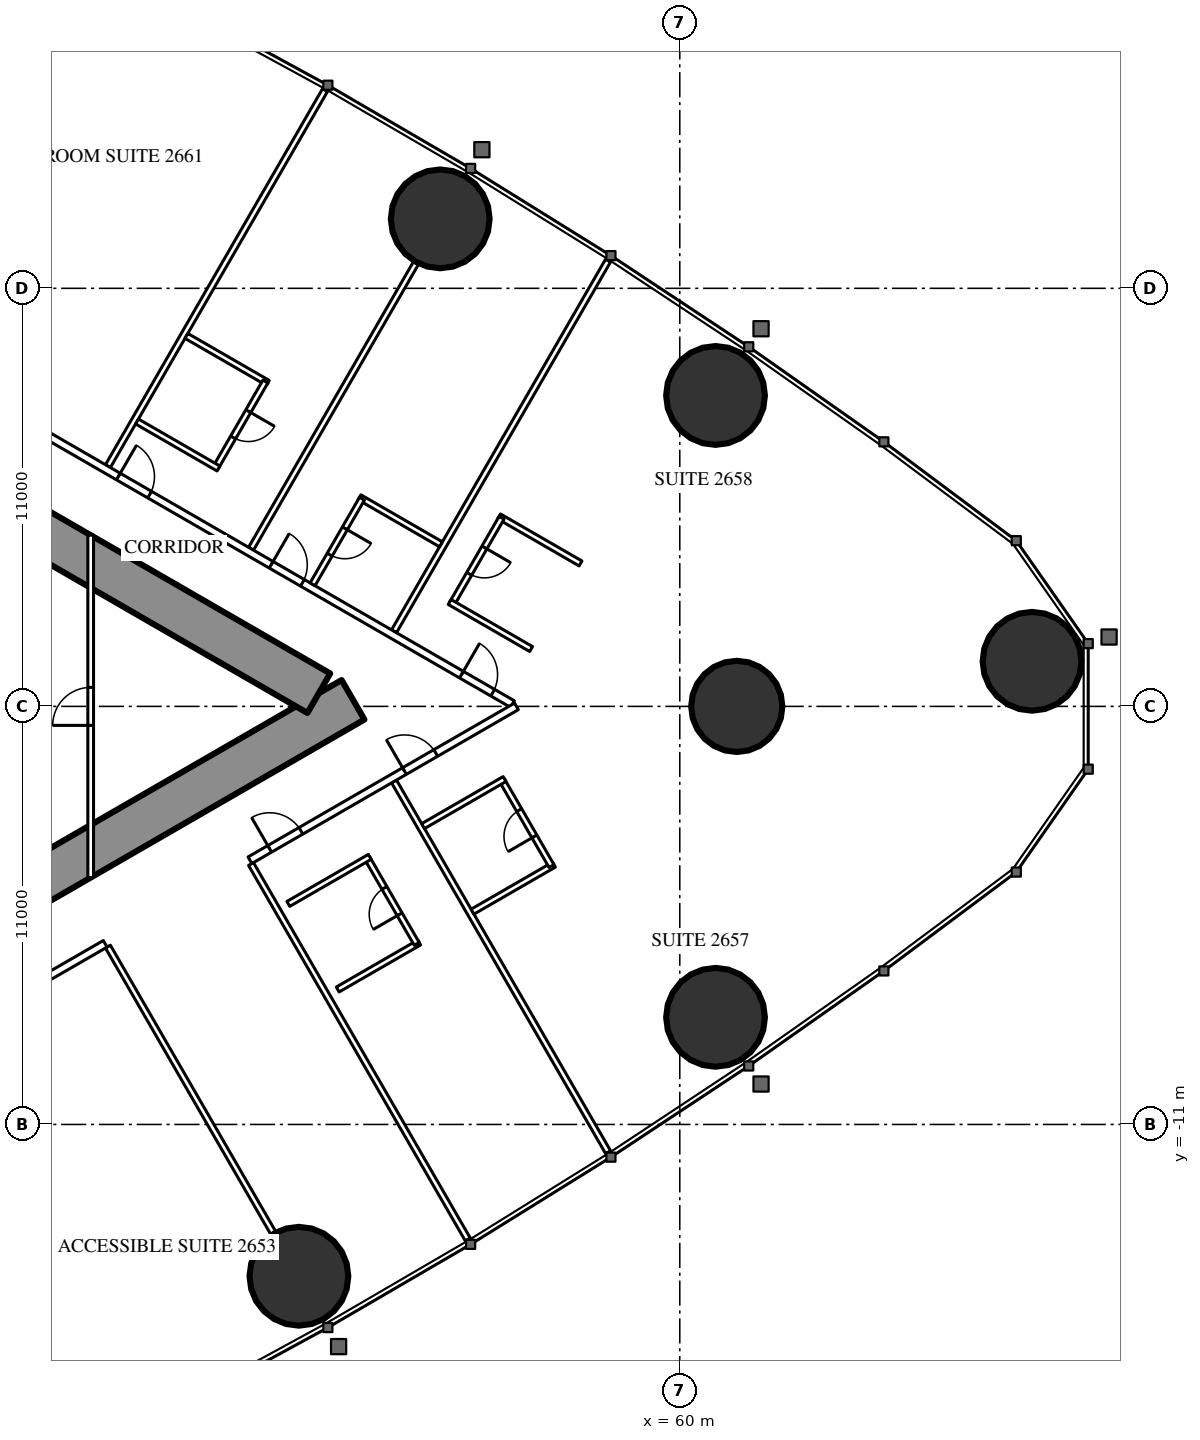
"""IFC4 building model, lengths in metres.
Left out: names, types, materials, properties, quantities, classifications, styles, units other than length and angle.
Written with IfcOpenShell. Run it as: python <this file> out.ifc"""

import sys

from ifc_helpers import new_model, si_unit, direction, frame, frame_2d, origin, origin_2d, place, context, subcontext, project, spatial, rectangle, circle, hollow_circle, extrude, element, fill, save


model = new_model("IFC4")
c1 = context("Model", 3, precision=1e-05, world=origin(), true_north=direction((0.0, 1.0)))
c2 = subcontext(c1, "Body", "Model", "MODEL_VIEW")
j1 = project(units=[si_unit("LENGTHUNIT", "METRE"), si_unit("PLANEANGLEUNIT", "RADIAN")], contexts=[c1])
p1 = place(None, origin())
s1 = spatial("IfcSite", under=j1, at=p1, CompositionType="ELEMENT")
p2 = place(p1, origin())
s2 = spatial("IfcBuilding", under=s1, at=p2, CompositionType="ELEMENT")
p3 = place(p2, frame((0.0, 0.0, 101.1)))
s3 = spatial("IfcBuildingStorey", under=s2, at=p3, CompositionType="ELEMENT", Elevation=101.1)
for number, where, z_axis, x_axis in (
    (1, (69.269, 1.187, 0.0), (0.0, 0.0, 1.0), (1.0, 0.0, 0.0)),
    (2, (60.941, 8.181, 0.0), (0.0, 0.0, 1.0), (1.0, 0.0, 0.0)),
    (3, (53.697, 12.827, 0.0), (0.0, 0.0, 1.0), (1.0, 0.0, 0.0)),
    (4, (49.979, -14.994, 0.0), (0.0, 0.0, 1.0), (1.0, 0.0, 0.0)),
    (5, (60.941, -8.181, 0.0), (0.0, 0.0, 1.0), (1.0, 0.0, 0.0)),
):
    element("IfcColumn", number, at=place(p3, frame(where, z_axis=z_axis, x_axis=x_axis)), inside=s3, PredefinedType="COLUMN", context=c2, shape_type="SweptSolid", body=[
        extrude(hollow_circle(Radius=1.3, WallThickness=0.1, at=origin_2d()), origin(), (0.0, 0.0, 1.0), 3.5),
    ])
p4 = place(p3, frame((61.5, 0.0, 0.0), z_axis=(0.0, 0.0, 1.0), x_axis=(1.0, 0.0, 0.0)))
e6 = element("IfcColumn", 6, at=p4, inside=s3, PredefinedType="COLUMN", context=c2, shape_type="SweptSolid", body=[
    extrude(circle(Radius=1.2, at=origin_2d()), origin(), (0.0, 0.0, 1.0), 3.5),
])
p5 = place(p3, frame((27.2, -13.8, 0.0), z_axis=(0.0, 0.0, 1.0), x_axis=(0.866027159892, 0.499996958321, 0.0)))
e7 = element("IfcWall", 7, at=p5, inside=s3, PredefinedType="SHEAR", context=c2, shape_type="SweptSolid", body=[
    extrude(rectangle(XDim=27.947, YDim=1.2, at=frame_2d((13.973, 0.0))), origin(), (0.0, 0.0, 1.0), 3.5),
])
p6 = place(p5, frame((4.6, 0.0, 0.0)))
e8 = element("IfcOpeningElement", 8, at=p6, cuts=e7, PredefinedType="OPENING", context=c2, shape_type="SweptSolid", body=[
    extrude(rectangle(XDim=1.0, YDim=2.2, at=frame_2d((0.5, 1.1))), frame((0.0, 0.61, 0.0), z_axis=(0.0, -1.0, 0.0), x_axis=(1.0, 0.0, 0.0)), (0.0, 0.0, 1.0), 1.22),
])
p7 = place(p5, frame((13.395, 0.0, 0.0)))
e9 = element("IfcOpeningElement", 9, at=p7, cuts=e7, PredefinedType="OPENING", context=c2, shape_type="SweptSolid", body=[
    extrude(rectangle(XDim=1.8, YDim=2.2, at=frame_2d((0.9, 1.1))), frame((0.0, 0.61, 0.0), z_axis=(0.0, -1.0, 0.0), x_axis=(1.0, 0.0, 0.0)), (0.0, 0.0, 1.0), 1.22),
])
p8 = place(p3, frame((27.2, 13.8, 0.0), z_axis=(0.0, 0.0, 1.0), x_axis=(0.866024515034, -0.500001539357, 0.0)))
e10 = element("IfcWall", 10, at=p8, inside=s3, PredefinedType="SHEAR", context=c2, shape_type="SweptSolid", body=[
    extrude(rectangle(XDim=26.907, YDim=1.2, at=frame_2d((13.454, 0.0))), origin(), (0.0, 0.0, 1.0), 3.5),
])
p9 = place(p8, frame((4.6, 0.0, 0.0)))
e11 = element("IfcOpeningElement", 11, at=p9, cuts=e10, PredefinedType="OPENING", context=c2, shape_type="SweptSolid", body=[
    extrude(rectangle(XDim=1.0, YDim=2.2, at=frame_2d((0.5, 1.1))), frame((0.0, 0.61, 0.0), z_axis=(0.0, -1.0, 0.0), x_axis=(1.0, 0.0, 0.0)), (0.0, 0.0, 1.0), 1.22),
])
p10 = place(p8, frame((13.395, 0.0, 0.0)))
e12 = element("IfcOpeningElement", 12, at=p10, cuts=e10, PredefinedType="OPENING", context=c2, shape_type="SweptSolid", body=[
    extrude(rectangle(XDim=1.8, YDim=2.2, at=frame_2d((0.9, 1.1))), frame((0.0, 0.61, 0.0), z_axis=(0.0, -1.0, 0.0), x_axis=(1.0, 0.0, 0.0)), (0.0, 0.0, 1.0), 1.22),
])
p11 = place(p3, frame((44.954, -6.321, 0.0), z_axis=(0.0, 0.0, 1.0), x_axis=(0.500018676722, -0.866014620505, 0.0)))
e13 = element("IfcWall", 13, at=p11, inside=s3, PredefinedType="PARTITIONING", context=c2, shape_type="SweptSolid", body=[
    extrude(rectangle(XDim=8.704, YDim=0.15, at=frame_2d((4.352, 0.0))), origin(), (0.0, 0.0, 1.0), 2.2),
])
p12 = place(p3, frame((48.719, -4.147, 0.0), z_axis=(0.0, 0.0, 1.0), x_axis=(0.499990498062, -0.866030889661, 0.0)))
e14 = element("IfcWall", 14, at=p12, inside=s3, PredefinedType="PARTITIONING", context=c2, shape_type="SweptSolid", body=[
    extrude(rectangle(XDim=11.406, YDim=0.15, at=frame_2d((5.703, 0.0))), origin(), (0.0, 0.0, 1.0), 3.25),
])
p13 = place(p3, frame((52.481, -1.975, 0.0), z_axis=(0.0, 0.0, 1.0), x_axis=(0.500003867771, -0.866023170714, 0.0)))
e15 = element("IfcWall", 15, at=p13, inside=s3, PredefinedType="PARTITIONING", context=c2, shape_type="SweptSolid", body=[
    extrude(rectangle(XDim=11.265, YDim=0.15, at=frame_2d((5.632, 0.0))), origin(), (0.0, 0.0, 1.0), 3.25),
])
p14 = place(p3, frame((44.954, 6.321, 0.0), z_axis=(0.0, 0.0, 1.0), x_axis=(0.500009815811, 0.866019736549, 0.0)))
e16 = element("IfcWall", 16, at=p14, inside=s3, PredefinedType="PARTITIONING", context=c2, shape_type="SweptSolid", body=[
    extrude(rectangle(XDim=11.424, YDim=0.15, at=frame_2d((5.712, 0.0))), origin(), (0.0, 0.0, 1.0), 3.25),
])
p15 = place(p3, frame((48.719, 4.147, 0.0), z_axis=(0.0, 0.0, 1.0), x_axis=(0.499993328235, 0.866029255696, 0.0)))
e17 = element("IfcWall", 17, at=p15, inside=s3, PredefinedType="PARTITIONING", context=c2, shape_type="SweptSolid", body=[
    extrude(rectangle(XDim=8.686, YDim=0.15, at=frame_2d((4.343, 0.0))), origin(), (0.0, 0.0, 1.0), 2.2),
])
p16 = place(p3, frame((52.481, 1.975, 0.0), z_axis=(0.0, 0.0, 1.0), x_axis=(0.500003867771, 0.866023170714, 0.0)))
e18 = element("IfcWall", 18, at=p16, inside=s3, PredefinedType="PARTITIONING", context=c2, shape_type="SweptSolid", body=[
    extrude(rectangle(XDim=11.265, YDim=0.15, at=frame_2d((5.632, 0.0))), origin(), (0.0, 0.0, 1.0), 3.25),
])
p17 = place(p3, frame((36.834, 10.894, 0.0), z_axis=(0.0, 0.0, 1.0), x_axis=(0.866028157229, -0.499995230863, 0.0)))
e19 = element("IfcWall", 19, at=p17, inside=s3, PredefinedType="PARTITIONING", context=c2, shape_type="SweptSolid", body=[
    extrude(rectangle(XDim=21.667, YDim=0.2, at=frame_2d((10.833, 0.0))), origin(), (0.0, 0.0, 1.0), 3.25),
])
p18 = place(p17, frame((20.117, 0.0, 0.0)))
e20 = element("IfcOpeningElement", 20, at=p18, cuts=e19, PredefinedType="OPENING", context=c2, shape_type="SweptSolid", body=[
    extrude(rectangle(XDim=0.95, YDim=2.2, at=frame_2d((0.475, 1.1))), frame((0.0, 0.11, 0.0), z_axis=(0.0, -1.0, 0.0), x_axis=(1.0, 0.0, 0.0)), (0.0, 0.0, 1.0), 0.22),
])
p19 = place(p17, frame((14.335, 0.0, 0.0)))
e21 = element("IfcOpeningElement", 21, at=p19, cuts=e19, PredefinedType="OPENING", context=c2, shape_type="SweptSolid", body=[
    extrude(rectangle(XDim=0.95, YDim=2.2, at=frame_2d((0.475, 1.1))), frame((0.0, 0.11, 0.0), z_axis=(0.0, -1.0, 0.0), x_axis=(1.0, 0.0, 0.0)), (0.0, 0.0, 1.0), 0.22),
])
p20 = place(p17, frame((9.693, 0.0, 0.0)))
e22 = element("IfcOpeningElement", 22, at=p20, cuts=e19, PredefinedType="OPENING", context=c2, shape_type="SweptSolid", body=[
    extrude(rectangle(XDim=0.95, YDim=2.2, at=frame_2d((0.475, 1.1))), frame((0.0, 0.11, 0.0), z_axis=(0.0, -1.0, 0.0), x_axis=(1.0, 0.0, 0.0)), (0.0, 0.0, 1.0), 0.22),
])
p21 = place(p17, frame((2.95, 0.0, 0.0)))
e23 = element("IfcOpeningElement", 23, at=p21, cuts=e19, PredefinedType="OPENING", context=c2, shape_type="SweptSolid", body=[
    extrude(rectangle(XDim=0.95, YDim=2.2, at=frame_2d((0.475, 1.1))), frame((0.0, 0.11, 0.0), z_axis=(0.0, -1.0, 0.0), x_axis=(1.0, 0.0, 0.0)), (0.0, 0.0, 1.0), 0.22),
])
p22 = place(p3, frame((37.96, -10.243, 0.0), z_axis=(0.0, 0.0, 1.0), x_axis=(0.86603350054, 0.499985975746, 0.0)))
e24 = element("IfcWall", 24, at=p22, inside=s3, PredefinedType="PARTITIONING", context=c2, shape_type="SweptSolid", body=[
    extrude(rectangle(XDim=7.993, YDim=0.2, at=frame_2d((3.997, 0.0))), origin(), (0.0, 0.0, 1.0), 3.25),
])
p23 = place(p22, frame((3.35, 0.0, 0.0)))
e25 = element("IfcOpeningElement", 25, at=p23, cuts=e24, PredefinedType="OPENING", context=c2, shape_type="SweptSolid", body=[
    extrude(rectangle(XDim=1.0, YDim=2.2, at=frame_2d((0.5, 1.1))), frame((0.0, 0.11, 0.0), z_axis=(0.0, -1.0, 0.0), x_axis=(1.0, 0.0, 0.0)), (0.0, 0.0, 1.0), 0.22),
])
p24 = place(p3, frame((48.69, -4.048, 0.0), z_axis=(0.0, 0.0, 1.0), x_axis=(0.866026410209, 0.499998256818, 0.0)))
e26 = element("IfcWall", 26, at=p24, inside=s3, PredefinedType="PARTITIONING", context=c2, shape_type="SweptSolid", body=[
    extrude(rectangle(XDim=8.097, YDim=0.2, at=frame_2d((4.048, 0.0))), origin(), (0.0, 0.0, 1.0), 3.25),
])
p25 = place(p24, frame((0.6, 0.0, 0.0)))
e27 = element("IfcOpeningElement", 27, at=p25, cuts=e26, PredefinedType="OPENING", context=c2, shape_type="SweptSolid", body=[
    extrude(rectangle(XDim=0.95, YDim=2.2, at=frame_2d((0.475, 1.1))), frame((0.0, 0.11, 0.0), z_axis=(0.0, -1.0, 0.0), x_axis=(1.0, 0.0, 0.0)), (0.0, 0.0, 1.0), 0.22),
])
p26 = place(p24, frame((4.695, 0.0, 0.0)))
e28 = element("IfcOpeningElement", 28, at=p26, cuts=e26, PredefinedType="OPENING", context=c2, shape_type="SweptSolid", body=[
    extrude(rectangle(XDim=0.95, YDim=2.2, at=frame_2d((0.475, 1.1))), frame((0.0, 0.11, 0.0), z_axis=(0.0, -1.0, 0.0), x_axis=(1.0, 0.0, 0.0)), (0.0, 0.0, 1.0), 0.22),
])
p27 = place(p3, frame((51.0, -7.449, 0.0), z_axis=(0.0, 0.0, 1.0), x_axis=(0.866006523861, 0.500032699561, 0.0)))
e29 = element("IfcWall", 29, at=p27, inside=s3, PredefinedType="PARTITIONING", context=c2, shape_type="SweptSolid", body=[
    extrude(rectangle(XDim=2.475, YDim=0.15, at=frame_2d((1.237, 0.0))), origin(), (0.0, 0.0, 1.0), 3.25),
])
p28 = place(p3, frame((51.778, -3.998, 0.0), z_axis=(0.0, 0.0, 1.0), x_axis=(0.500047596559, -0.865997922154, 0.0)))
e30 = element("IfcWall", 30, at=p28, inside=s3, PredefinedType="PARTITIONING", context=c2, shape_type="SweptSolid", body=[
    extrude(rectangle(XDim=2.6, YDim=0.15, at=frame_2d((1.3, 0.0))), origin(), (0.0, 0.0, 1.0), 3.25),
])
p29 = place(p28, frame((0.9, 0.0, 0.0)))
e31 = element("IfcOpeningElement", 31, at=p29, cuts=e30, PredefinedType="OPENING", context=c2, shape_type="SweptSolid", body=[
    extrude(rectangle(XDim=0.8, YDim=2.2, at=frame_2d((0.4, 1.1))), frame((0.0, 0.085, 0.0), z_axis=(0.0, -1.0, 0.0), x_axis=(1.0, 0.0, 0.0)), (0.0, 0.0, 1.0), 0.17),
])
for number, where, z_axis, x_axis in (
    (32, (49.7, -5.198, 0.0), (0.0, 0.0, 1.0), (0.866, 0.5, 0.0)),
    (33, (54.546, -5.402, 0.0), (0.0, 0.0, 1.0), (0.866, 0.5, 0.0)),
):
    element("IfcWall", number, at=place(p3, frame(where, z_axis=z_axis, x_axis=x_axis)), inside=s3, PredefinedType="PARTITIONING", context=c2, shape_type="SweptSolid", body=[
        extrude(rectangle(XDim=2.475, YDim=0.15, at=frame_2d((1.237, 0.0))), origin(), (0.0, 0.0, 1.0), 3.25),
    ])
p30 = place(p3, frame((55.325, -1.95, 0.0), z_axis=(0.0, 0.0, 1.0), x_axis=(0.500006934395, -0.866021400173, 0.0)))
e34 = element("IfcWall", 34, at=p30, inside=s3, PredefinedType="PARTITIONING", context=c2, shape_type="SweptSolid", body=[
    extrude(rectangle(XDim=2.6, YDim=0.15, at=frame_2d((1.3, 0.0))), origin(), (0.0, 0.0, 1.0), 3.25),
])
p31 = place(p30, frame((0.9, 0.0, 0.0)))
e35 = element("IfcOpeningElement", 35, at=p31, cuts=e34, PredefinedType="OPENING", context=c2, shape_type="SweptSolid", body=[
    extrude(rectangle(XDim=0.8, YDim=2.2, at=frame_2d((0.4, 1.1))), frame((0.0, 0.085, 0.0), z_axis=(0.0, -1.0, 0.0), x_axis=(1.0, 0.0, 0.0)), (0.0, 0.0, 1.0), 0.17),
])
for number, where, z_axis, x_axis in (
    (36, (53.246, -3.15, 0.0), (0.0, 0.0, 1.0), (0.866, 0.5, 0.0)),
    (37, (55.245, 4.998, 0.0), (0.0, 0.0, 1.0), (0.866, -0.5, 0.0)),
):
    element("IfcWall", number, at=place(p3, frame(where, z_axis=z_axis, x_axis=x_axis)), inside=s3, PredefinedType="PARTITIONING", context=c2, shape_type="SweptSolid", body=[
        extrude(rectangle(XDim=2.475, YDim=0.15, at=frame_2d((1.237, 0.0))), origin(), (0.0, 0.0, 1.0), 3.25),
    ])
p32 = place(p3, frame((54.01, 2.709, 0.0), z_axis=(0.0, 0.0, 1.0), x_axis=(0.500006934395, 0.866021400173, 0.0)))
e38 = element("IfcWall", 38, at=p32, inside=s3, PredefinedType="PARTITIONING", context=c2, shape_type="SweptSolid", body=[
    extrude(rectangle(XDim=2.6, YDim=0.15, at=frame_2d((1.3, 0.0))), origin(), (0.0, 0.0, 1.0), 3.25),
])
p33 = place(p32, frame((0.9, 0.0, 0.0)))
e39 = element("IfcOpeningElement", 39, at=p33, cuts=e38, PredefinedType="OPENING", context=c2, shape_type="SweptSolid", body=[
    extrude(rectangle(XDim=0.8, YDim=2.2, at=frame_2d((0.4, 1.1))), frame((0.0, 0.085, 0.0), z_axis=(0.0, -1.0, 0.0), x_axis=(1.0, 0.0, 0.0)), (0.0, 0.0, 1.0), 0.17),
])
p34 = place(p3, frame((53.945, 2.747, 0.0), z_axis=(0.0, 0.0, 1.0), x_axis=(0.866031185235, -0.4999899861, 0.0)))
e40 = element("IfcWall", 40, at=p34, inside=s3, PredefinedType="PARTITIONING", context=c2, shape_type="SweptSolid", body=[
    extrude(rectangle(XDim=2.475, YDim=0.15, at=frame_2d((1.238, 0.0))), origin(), (0.0, 0.0, 1.0), 3.25),
])
p35 = place(p3, frame((51.573, 5.502, 0.0), z_axis=(0.0, 0.0, 1.0), x_axis=(0.866006523861, -0.500032699561, 0.0)))
e41 = element("IfcWall", 41, at=p35, inside=s3, PredefinedType="PARTITIONING", context=c2, shape_type="SweptSolid", body=[
    extrude(rectangle(XDim=2.475, YDim=0.15, at=frame_2d((1.237, 0.0))), origin(), (0.0, 0.0, 1.0), 3.25),
])
p36 = place(p3, frame((50.338, 3.213, 0.0), z_axis=(0.0, 0.0, 1.0), x_axis=(0.500047596559, 0.865997922154, 0.0)))
e42 = element("IfcWall", 42, at=p36, inside=s3, PredefinedType="PARTITIONING", context=c2, shape_type="SweptSolid", body=[
    extrude(rectangle(XDim=2.6, YDim=0.15, at=frame_2d((1.3, 0.0))), origin(), (0.0, 0.0, 1.0), 3.25),
])
p37 = place(p36, frame((0.9, 0.0, 0.0)))
e43 = element("IfcOpeningElement", 43, at=p37, cuts=e42, PredefinedType="OPENING", context=c2, shape_type="SweptSolid", body=[
    extrude(rectangle(XDim=0.8, YDim=2.2, at=frame_2d((0.4, 1.1))), frame((0.0, 0.085, 0.0), z_axis=(0.0, -1.0, 0.0), x_axis=(1.0, 0.0, 0.0)), (0.0, 0.0, 1.0), 0.17),
])
p38 = place(p3, frame((47.019, 9.748, 0.0), z_axis=(0.0, 0.0, 1.0), x_axis=(0.866006523861, -0.500032699561, 0.0)))
e44 = element("IfcWall", 44, at=p38, inside=s3, PredefinedType="PARTITIONING", context=c2, shape_type="SweptSolid", body=[
    extrude(rectangle(XDim=2.475, YDim=0.15, at=frame_2d((1.237, 0.0))), origin(), (0.0, 0.0, 1.0), 3.25),
])
p39 = place(p3, frame((47.797, 6.296, 0.0), z_axis=(0.0, 0.0, 1.0), x_axis=(0.499936506574, 0.866062058628, 0.0)))
e45 = element("IfcWall", 45, at=p39, inside=s3, PredefinedType="PARTITIONING", context=c2, shape_type="SweptSolid", body=[
    extrude(rectangle(XDim=2.6, YDim=0.15, at=frame_2d((1.3, 0.0))), origin(), (0.0, 0.0, 1.0), 3.25),
])
p40 = place(p39, frame((0.9, 0.0, 0.0)))
e46 = element("IfcOpeningElement", 46, at=p40, cuts=e45, PredefinedType="OPENING", context=c2, shape_type="SweptSolid", body=[
    extrude(rectangle(XDim=0.8, YDim=2.2, at=frame_2d((0.4, 1.1))), frame((0.0, 0.085, 0.0), z_axis=(0.0, -1.0, 0.0), x_axis=(1.0, 0.0, 0.0)), (0.0, 0.0, 1.0), 0.17),
])
p41 = place(p3, frame((45.719, 7.496, 0.0), z_axis=(0.0, 0.0, 1.0), x_axis=(0.866031185235, -0.4999899861, 0.0)))
e47 = element("IfcWall", 47, at=p41, inside=s3, PredefinedType="PARTITIONING", context=c2, shape_type="SweptSolid", body=[
    extrude(rectangle(XDim=2.475, YDim=0.15, at=frame_2d((1.238, 0.0))), origin(), (0.0, 0.0, 1.0), 3.25),
])
p42 = place(p3, frame((44.5, -4.505, 0.0), z_axis=(0.0, 0.0, 1.0), x_axis=(0.0, 1.0, 0.0)))
e48 = element("IfcWall", 48, at=p42, inside=s3, PredefinedType="PARTITIONING", context=c2, shape_type="SweptSolid", body=[
    extrude(rectangle(XDim=9.009, YDim=0.15, at=frame_2d((4.505, 0.0))), origin(), (0.0, 0.0, 1.0), 2.45),
])
p43 = place(p42, frame((4.005, 0.0, 0.0)))
e49 = element("IfcOpeningElement", 49, at=p43, cuts=e48, PredefinedType="OPENING", context=c2, shape_type="SweptSolid", body=[
    extrude(rectangle(XDim=1.0, YDim=2.2, at=frame_2d((0.5, 1.1))), frame((0.0, 0.085, 0.0), z_axis=(0.0, -1.0, 0.0), x_axis=(1.0, 0.0, 0.0)), (0.0, 0.0, 1.0), 0.17),
])
p44 = place(p29, origin())
e50 = element("IfcDoor", 50, at=p44, inside=s3, OperationType="SINGLE_SWING_RIGHT", PredefinedType="DOOR", context=c2, shape_type="SweptSolid", body=[
    extrude(rectangle(XDim=0.8, YDim=2.2, at=frame_2d((0.4, 1.1))), frame((0.0, 0.025, 0.0), z_axis=(0.0, -1.0, 0.0), x_axis=(1.0, 0.0, 0.0)), (0.0, 0.0, 1.0), 0.05),
])
fill(e31, e50)
p45 = place(p25, origin())
e51 = element("IfcDoor", 51, at=p45, inside=s3, OperationType="SINGLE_SWING_LEFT", PredefinedType="DOOR", context=c2, shape_type="SweptSolid", body=[
    extrude(rectangle(XDim=0.95, YDim=2.2, at=frame_2d((0.475, 1.1))), frame((0.0, 0.025, 0.0), z_axis=(0.0, -1.0, 0.0), x_axis=(1.0, 0.0, 0.0)), (0.0, 0.0, 1.0), 0.05),
])
fill(e27, e51)
p46 = place(p31, origin())
e52 = element("IfcDoor", 52, at=p46, inside=s3, OperationType="SINGLE_SWING_RIGHT", PredefinedType="DOOR", context=c2, shape_type="SweptSolid", body=[
    extrude(rectangle(XDim=0.8, YDim=2.2, at=frame_2d((0.4, 1.1))), frame((0.0, 0.025, 0.0), z_axis=(0.0, -1.0, 0.0), x_axis=(1.0, 0.0, 0.0)), (0.0, 0.0, 1.0), 0.05),
])
fill(e35, e52)
p47 = place(p26, origin())
e53 = element("IfcDoor", 53, at=p47, inside=s3, OperationType="SINGLE_SWING_LEFT", PredefinedType="DOOR", context=c2, shape_type="SweptSolid", body=[
    extrude(rectangle(XDim=0.95, YDim=2.2, at=frame_2d((0.475, 1.1))), frame((0.0, 0.025, 0.0), z_axis=(0.0, -1.0, 0.0), x_axis=(1.0, 0.0, 0.0)), (0.0, 0.0, 1.0), 0.05),
])
fill(e28, e53)
p48 = place(p33, origin())
e54 = element("IfcDoor", 54, at=p48, inside=s3, OperationType="SINGLE_SWING_RIGHT", PredefinedType="DOOR", context=c2, shape_type="SweptSolid", body=[
    extrude(rectangle(XDim=0.8, YDim=2.2, at=frame_2d((0.4, 1.1))), frame((0.0, 0.025, 0.0), z_axis=(0.0, -1.0, 0.0), x_axis=(1.0, 0.0, 0.0)), (0.0, 0.0, 1.0), 0.05),
])
fill(e39, e54)
p49 = place(p18, origin())
e55 = element("IfcDoor", 55, at=p49, inside=s3, OperationType="SINGLE_SWING_LEFT", PredefinedType="DOOR", context=c2, shape_type="SweptSolid", body=[
    extrude(rectangle(XDim=0.95, YDim=2.2, at=frame_2d((0.475, 1.1))), frame((0.0, 0.025, 0.0), z_axis=(0.0, -1.0, 0.0), x_axis=(1.0, 0.0, 0.0)), (0.0, 0.0, 1.0), 0.05),
])
fill(e20, e55)
p50 = place(p37, origin())
e56 = element("IfcDoor", 56, at=p50, inside=s3, OperationType="SINGLE_SWING_RIGHT", PredefinedType="DOOR", context=c2, shape_type="SweptSolid", body=[
    extrude(rectangle(XDim=0.8, YDim=2.2, at=frame_2d((0.4, 1.1))), frame((0.0, 0.025, 0.0), z_axis=(0.0, -1.0, 0.0), x_axis=(1.0, 0.0, 0.0)), (0.0, 0.0, 1.0), 0.05),
])
fill(e43, e56)
p51 = place(p19, origin())
e57 = element("IfcDoor", 57, at=p51, inside=s3, OperationType="SINGLE_SWING_LEFT", PredefinedType="DOOR", context=c2, shape_type="SweptSolid", body=[
    extrude(rectangle(XDim=0.95, YDim=2.2, at=frame_2d((0.475, 1.1))), frame((0.0, 0.025, 0.0), z_axis=(0.0, -1.0, 0.0), x_axis=(1.0, 0.0, 0.0)), (0.0, 0.0, 1.0), 0.05),
])
fill(e21, e57)
p52 = place(p40, origin())
e58 = element("IfcDoor", 58, at=p52, inside=s3, OperationType="SINGLE_SWING_RIGHT", PredefinedType="DOOR", context=c2, shape_type="SweptSolid", body=[
    extrude(rectangle(XDim=0.8, YDim=2.2, at=frame_2d((0.4, 1.1))), frame((0.0, 0.025, 0.0), z_axis=(0.0, -1.0, 0.0), x_axis=(1.0, 0.0, 0.0)), (0.0, 0.0, 1.0), 0.05),
])
fill(e46, e58)
p53 = place(p20, origin())
e59 = element("IfcDoor", 59, at=p53, inside=s3, OperationType="SINGLE_SWING_LEFT", PredefinedType="DOOR", context=c2, shape_type="SweptSolid", body=[
    extrude(rectangle(XDim=0.95, YDim=2.2, at=frame_2d((0.475, 1.1))), frame((0.0, 0.025, 0.0), z_axis=(0.0, -1.0, 0.0), x_axis=(1.0, 0.0, 0.0)), (0.0, 0.0, 1.0), 0.05),
])
fill(e22, e59)
p54 = place(p43, origin())
e60 = element("IfcDoor", 60, at=p54, inside=s3, OperationType="SINGLE_SWING_LEFT", PredefinedType="DOOR", context=c2, shape_type="SweptSolid", body=[
    extrude(rectangle(XDim=1.0, YDim=2.2, at=frame_2d((0.5, 1.1))), frame((0.0, 0.025, 0.0), z_axis=(0.0, -1.0, 0.0), x_axis=(1.0, 0.0, 0.0)), (0.0, 0.0, 1.0), 0.05),
])
fill(e49, e60)
save(model, sys.argv[1])
